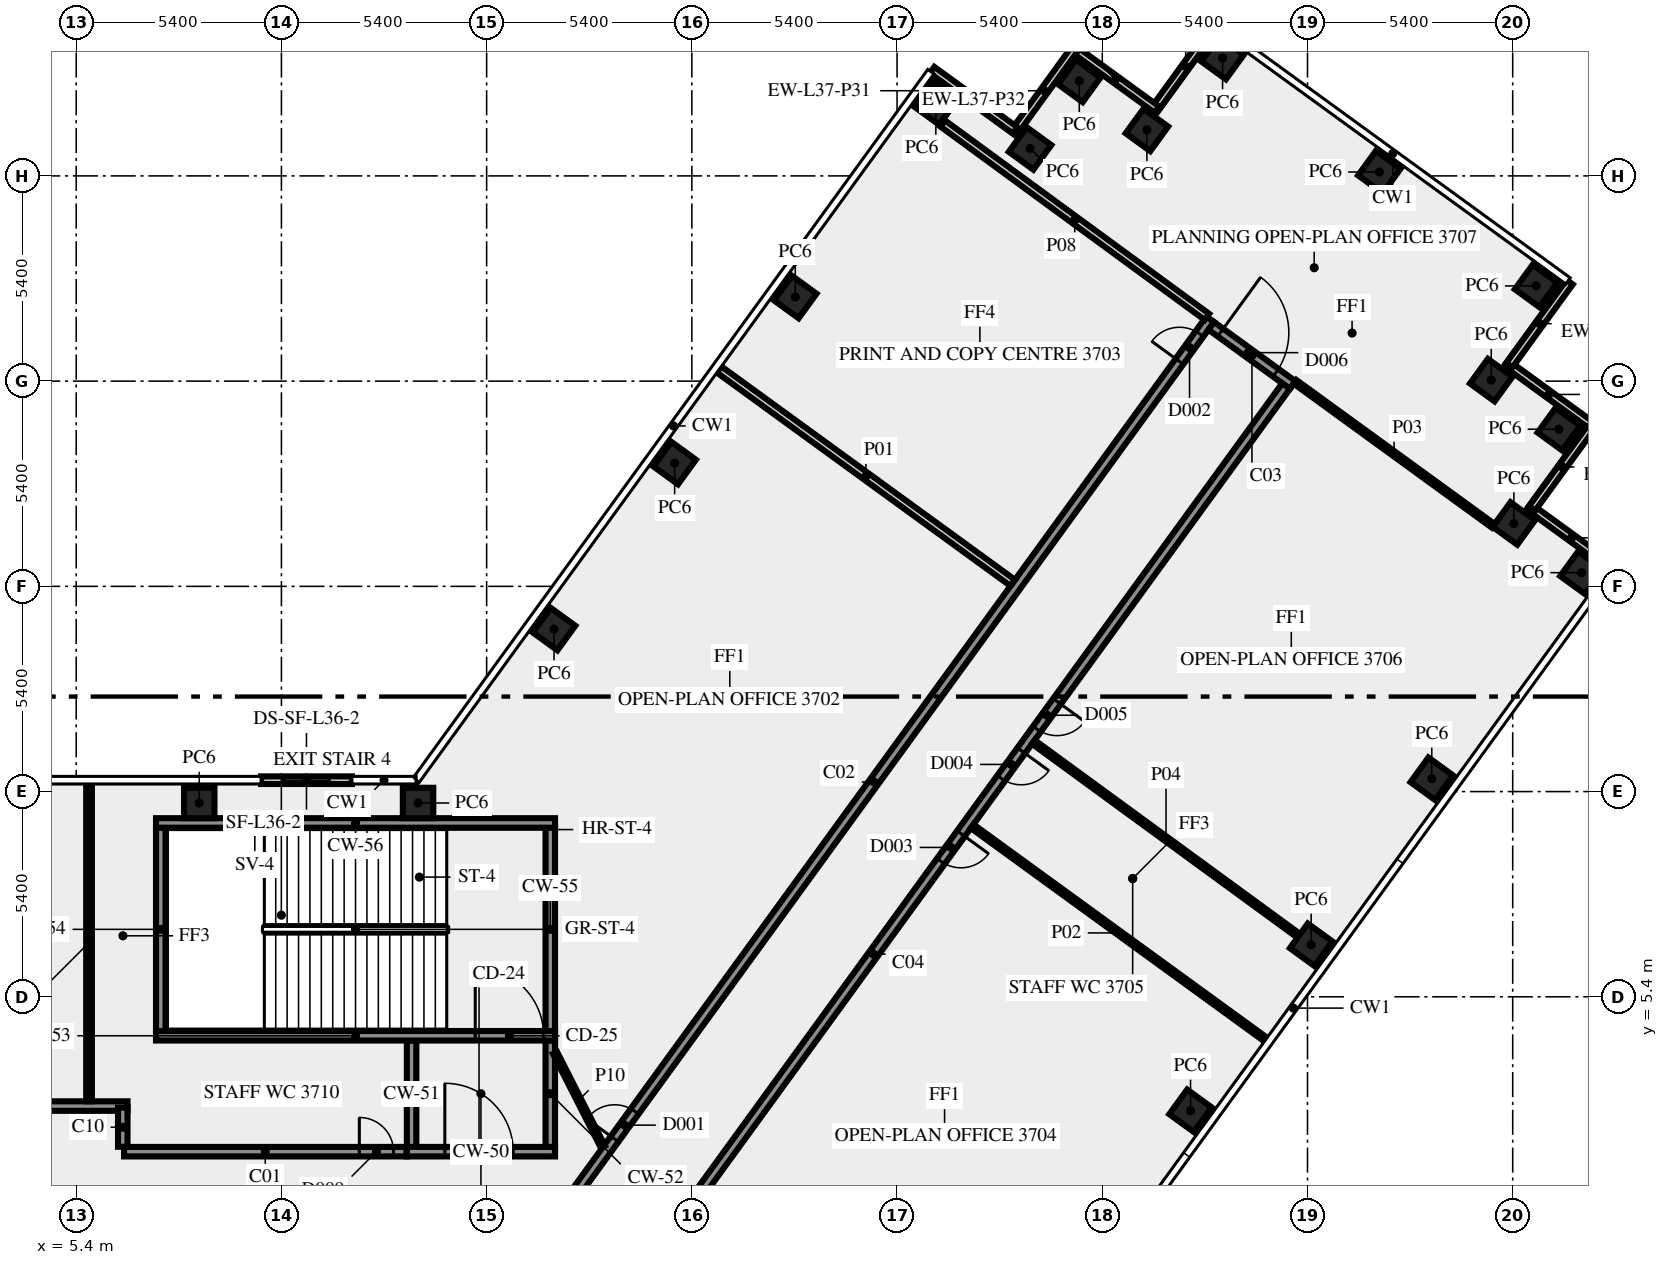
"""IFC4 building model, lengths in metres.
Left out: names, types, materials, properties, quantities, classifications, styles, units other than length and angle.
Written with IfcOpenShell. Run it as: python <this file> out.ifc"""

import sys

from ifc_helpers import new_model, si_unit, direction, frame, frame_2d, origin, origin_2d, place, context, subcontext, project, spatial, rectangle, extrude, element, fill, save


model = new_model("IFC4")
c1 = context("Model", 3, precision=1e-05, world=origin(), true_north=direction((0.0, 1.0)))
c2 = subcontext(c1, "Body", "Model", "MODEL_VIEW")
j1 = project(units=[si_unit("LENGTHUNIT", "METRE"), si_unit("PLANEANGLEUNIT", "RADIAN")], contexts=[c1])
p1 = place(None, origin())
s1 = spatial("IfcSite", under=j1, at=p1, CompositionType="ELEMENT")
p2 = place(p1, origin())
s2 = spatial("IfcBuilding", under=s1, at=p2, CompositionType="ELEMENT")
p3 = place(p2, frame((0.0, 0.0, 160.0)))
s3 = spatial("IfcBuildingStorey", under=s2, at=p3, CompositionType="ELEMENT", Elevation=160.0)
for number, where, z_axis, x_axis in (
    (1, (34.722, 2.4, 0.0), (0.0, 0.0, 1.0), (0.588, 0.809, 0.0)),
    (2, (37.896, 6.769, 0.0), (0.0, 0.0, 1.0), (0.588, 0.809, 0.0)),
    (3, (41.07, 11.137, 0.0), (0.0, 0.0, 1.0), (0.588, 0.809, 0.0)),
    (4, (45.01, 16.56, 0.0), (0.0, 0.0, 1.0), (0.588, 0.809, 0.0)),
    (5, (43.231, 17.854, 0.0), (0.0, 0.0, 1.0), (0.588, 0.809, 0.0)),
    (6, (44.415, 20.335, 0.0), (0.0, 0.0, 1.0), (0.588, 0.809, 0.0)),
    (7, (42.635, 21.626, 0.0), (0.0, 0.0, 1.0), (-0.809, 0.588, 0.0)),
    (8, (43.815, 24.105, 0.0), (0.0, 0.0, 1.0), (-0.809, 0.588, 0.0)),
    (9, (39.691, 27.102, 0.0), (0.0, 0.0, 1.0), (-0.809, 0.588, 0.0)),
    (10, (35.565, 30.1, 0.0), (0.0, 0.0, 1.0), (-0.588, -0.809, 0.0)),
    (11, (33.574, 28.209, 0.0), (0.0, 0.0, 1.0), (-0.809, 0.588, 0.0)),
    (12, (31.795, 29.5, 0.0), (0.0, 0.0, 1.0), (-0.588, -0.809, 0.0)),
    (13, (30.499, 27.723, 0.0), (0.0, 0.0, 1.0), (-0.809, 0.588, 0.0)),
    (14, (28.02, 28.905, 0.0), (0.0, 0.0, 1.0), (-0.809, 0.588, 0.0)),
    (15, (24.321, 23.812, 0.0), (0.0, 0.0, 1.0), (-0.588, -0.809, 0.0)),
    (16, (21.147, 19.444, 0.0), (0.0, 0.0, 1.0), (-0.588, -0.809, 0.0)),
    (17, (17.974, 15.075, 0.0), (0.0, 0.0, 1.0), (-0.588, -0.809, 0.0)),
    (18, (14.395, 10.5, 0.0), (0.0, 0.0, 1.0), (-1.0, 0.0, 0.0)),
    (19, (8.637, 10.5, 0.0), (0.0, 0.0, 1.0), (-1.0, 0.0, 0.0)),
):
    element("IfcColumn", number, at=place(p3, frame(where, z_axis=z_axis, x_axis=x_axis)), inside=s3, PredefinedType="COLUMN", context=c2, shape_type="SweptSolid", body=[
        extrude(rectangle(XDim=0.8, YDim=0.8, at=origin_2d()), origin(), (0.0, 0.0, 1.0), 3.65),
    ])
for number, where, z_axis, x_axis in (
    (20, (45.842, 16.685, 0.0), (0.0, 0.0, 1.0), (-0.809, 0.588, 0.0)),
    (21, (43.709, 18.249, 0.0), (0.0, 0.0, 1.0), (0.588, 0.809, 0.0)),
    (22, (45.245, 20.456, 0.0), (0.0, 0.0, 1.0), (-0.809, 0.588, 0.0)),
    (23, (43.113, 22.02, 0.0), (0.0, 0.0, 1.0), (0.588, 0.809, 0.0)),
    (24, (35.388, 30.97, 0.0), (0.0, 0.0, 1.0), (-0.588, -0.809, 0.0)),
    (25, (33.838, 28.744, 0.0), (0.0, 0.0, 1.0), (-0.809, 0.588, 0.0)),
    (26, (31.67, 30.333, 0.0), (0.0, 0.0, 1.0), (-0.588, -0.809, 0.0)),
    (27, (30.106, 28.2, 0.0), (0.0, 0.0, 1.0), (-0.809, 0.588, 0.0)),
):
    element("IfcWall", number, at=place(p3, frame(where, z_axis=z_axis, x_axis=x_axis)), inside=s3, PredefinedType="SOLIDWALL", context=c2, shape_type="SweptSolid", body=[
        extrude(rectangle(XDim=2.7, YDim=0.2, at=frame_2d((1.35, 0.0))), origin(), (0.0, 0.0, 1.0), 3.65),
    ])
p4 = place(p3, frame((12.655, 11.1, 0.0), z_axis=(0.0, 0.0, 1.0), x_axis=(-1.0, 0.0, 0.0)))
e28 = element("IfcWall", 28, at=p4, inside=s3, PredefinedType="SOLIDWALL", context=c2, shape_type="SweptSolid", body=[
    extrude(rectangle(XDim=2.392, YDim=0.2, at=frame_2d((1.196, 0.0))), origin(), (0.0, 0.0, 1.0), 3.65),
])
p5 = place(p4, frame((0.596, 0.0, 1.0)))
e29 = element("IfcOpeningElement", 29, at=p5, cuts=e28, PredefinedType="OPENING", context=c2, shape_type="SweptSolid", body=[
    extrude(rectangle(XDim=1.2, YDim=1.2, at=frame_2d((0.6, 0.6))), frame((0.0, 0.11, 0.0), z_axis=(0.0, -1.0, 0.0), x_axis=(1.0, 0.0, 0.0)), (0.0, 0.0, 1.0), 0.22),
])
p6 = place(p3, frame((14.1, 1.325, 0.0), z_axis=(0.0, 0.0, 1.0), x_axis=(1.0, 0.0, 0.0)))
e30 = element("IfcWall", 30, at=p6, inside=s3, PredefinedType="SHEAR", context=c2, shape_type="SweptSolid", body=[
    extrude(rectangle(XDim=3.9, YDim=0.25, at=frame_2d((1.95, 0.0))), origin(), (0.0, 0.0, 1.0), 3.65),
])
p7 = place(p6, frame((1.0, 0.0, 0.0)))
e31 = element("IfcOpeningElement", 31, at=p7, cuts=e30, PredefinedType="OPENING", context=c2, shape_type="SweptSolid", body=[
    extrude(rectangle(XDim=1.8, YDim=2.1, at=frame_2d((0.9, 1.05))), frame((0.0, 0.135, 0.0), z_axis=(0.0, -1.0, 0.0), x_axis=(1.0, 0.0, 0.0)), (0.0, 0.0, 1.0), 0.27),
])
for number, where, z_axis, x_axis in (
    (32, (14.225, 1.45, 0.0), (0.0, 0.0, 1.0), (0.0, 1.0, 0.0)),
    (33, (17.875, 1.45, 0.0), (0.0, 0.0, 1.0), (0.0, 1.0, 0.0)),
):
    element("IfcWall", number, at=place(p3, frame(where, z_axis=z_axis, x_axis=x_axis)), inside=s3, PredefinedType="SHEAR", context=c2, shape_type="SweptSolid", body=[
        extrude(rectangle(XDim=2.8, YDim=0.25, at=frame_2d((1.4, 0.0))), origin(), (0.0, 0.0, 1.0), 3.65),
    ])
p8 = place(p3, frame((7.5, 4.375, 0.0), z_axis=(0.0, 0.0, 1.0), x_axis=(1.0, 0.0, 0.0)))
e34 = element("IfcWall", 34, at=p8, inside=s3, PredefinedType="SHEAR", context=c2, shape_type="SweptSolid", body=[
    extrude(rectangle(XDim=10.5, YDim=0.25, at=frame_2d((5.25, 0.0))), origin(), (0.0, 0.0, 1.0), 3.65),
])
p9 = place(p8, frame((8.4, 0.0, 0.0)))
e35 = element("IfcOpeningElement", 35, at=p9, cuts=e34, PredefinedType="OPENING", context=c2, shape_type="SweptSolid", body=[
    extrude(rectangle(XDim=1.8, YDim=2.1, at=frame_2d((0.9, 1.05))), frame((0.0, 0.135, 0.0), z_axis=(0.0, -1.0, 0.0), x_axis=(1.0, 0.0, 0.0)), (0.0, 0.0, 1.0), 0.27),
])
for number, where, z_axis, x_axis in (
    (36, (7.625, 4.5, 0.0), (0.0, 0.0, 1.0), (0.0, 1.0, 0.0)),
    (37, (17.875, 4.5, 0.0), (0.0, 0.0, 1.0), (0.0, 1.0, 0.0)),
):
    element("IfcWall", number, at=place(p3, frame(where, z_axis=z_axis, x_axis=x_axis)), inside=s3, PredefinedType="SHEAR", context=c2, shape_type="SweptSolid", body=[
        extrude(rectangle(XDim=5.35, YDim=0.25, at=frame_2d((2.675, 0.0))), origin(), (0.0, 0.0, 1.0), 3.65),
    ])
p10 = place(p3, frame((7.5, 9.975, 0.0), z_axis=(0.0, 0.0, 1.0), x_axis=(1.0, 0.0, 0.0)))
e38 = element("IfcWall", 38, at=p10, inside=s3, PredefinedType="SHEAR", context=c2, shape_type="SweptSolid", body=[
    extrude(rectangle(XDim=10.5, YDim=0.25, at=frame_2d((5.25, 0.0))), origin(), (0.0, 0.0, 1.0), 3.65),
])
p11 = place(p10, frame((2.0, 0.0, 1.0)))
e39 = element("IfcOpeningElement", 39, at=p11, cuts=e38, PredefinedType="OPENING", context=c2, shape_type="SweptSolid", body=[
    extrude(rectangle(XDim=1.2, YDim=1.2, at=frame_2d((0.6, 0.6))), frame((0.0, 0.135, 0.0), z_axis=(0.0, -1.0, 0.0), x_axis=(1.0, 0.0, 0.0)), (0.0, 0.0, 1.0), 0.27),
])
p12 = place(p3, frame((6.659, 1.325, 0.0), z_axis=(0.0, 0.0, 1.0), x_axis=(1.0, 0.0, 0.0)))
e40 = element("IfcWall", 40, at=p12, inside=s3, PredefinedType="SOLIDWALL", context=c2, shape_type="SweptSolid", body=[
    extrude(rectangle(XDim=7.431, YDim=0.25, at=frame_2d((3.716, 0.0))), origin(), (0.0, 0.0, 1.0), 3.65),
])
p13 = place(p12, frame((6.191, 0.0, 0.0)))
e41 = element("IfcOpeningElement", 41, at=p13, cuts=e40, PredefinedType="OPENING", context=c2, shape_type="SweptSolid", body=[
    extrude(rectangle(XDim=0.9, YDim=2.1, at=frame_2d((0.45, 1.05))), frame((0.0, 0.135, 0.0), z_axis=(0.0, -1.0, 0.0), x_axis=(1.0, 0.0, 0.0)), (0.0, 0.0, 1.0), 0.27),
])
p14 = place(p3, frame((17.545, -1.125, 0.0), z_axis=(0.0, 0.0, 1.0), x_axis=(0.587786330937, 0.809016210693, 0.0)))
e42 = element("IfcWall", 42, at=p14, inside=s3, PredefinedType="SOLIDWALL", context=c2, shape_type="SweptSolid", body=[
    extrude(rectangle(XDim=30.103, YDim=0.25, at=frame_2d((15.052, 0.0))), origin(), (0.0, 0.0, 1.0), 3.65),
])
p15 = place(p14, frame((3.441, 0.0, 0.0)))
e43 = element("IfcOpeningElement", 43, at=p15, cuts=e42, PredefinedType="OPENING", context=c2, shape_type="SweptSolid", body=[
    extrude(rectangle(XDim=0.9, YDim=2.1, at=frame_2d((0.45, 1.05))), frame((0.0, 0.135, 0.0), z_axis=(0.0, -1.0, 0.0), x_axis=(1.0, 0.0, 0.0)), (0.0, 0.0, 1.0), 0.27),
])
p16 = place(p14, frame((28.729, 0.0, 0.0)))
e44 = element("IfcOpeningElement", 44, at=p16, cuts=e42, PredefinedType="OPENING", context=c2, shape_type="SweptSolid", body=[
    extrude(rectangle(XDim=0.9, YDim=2.1, at=frame_2d((0.45, 1.05))), frame((0.0, 0.135, 0.0), z_axis=(0.0, -1.0, 0.0), x_axis=(1.0, 0.0, 0.0)), (0.0, 0.0, 1.0), 0.27),
])
p17 = place(p3, frame((35.267, 23.054, 0.0), z_axis=(0.0, 0.0, 1.0), x_axis=(0.809038743598, -0.587755315891, 0.0)))
e45 = element("IfcWall", 45, at=p17, inside=s3, PredefinedType="SOLIDWALL", context=c2, shape_type="SweptSolid", body=[
    extrude(rectangle(XDim=2.65, YDim=0.25, at=frame_2d((1.325, 0.0))), origin(), (0.0, 0.0, 1.0), 3.65),
])
p18 = place(p17, frame((0.3, 0.0, 0.0)))
e46 = element("IfcOpeningElement", 46, at=p18, cuts=e45, PredefinedType="OPENING", context=c2, shape_type="SweptSolid", body=[
    extrude(rectangle(XDim=1.8, YDim=2.1, at=frame_2d((0.9, 1.05))), frame((0.0, 0.135, 0.0), z_axis=(0.0, -1.0, 0.0), x_axis=(1.0, 0.0, 0.0)), (0.0, 0.0, 1.0), 0.27),
])
p19 = place(p3, frame((37.236, 21.469, 0.0), z_axis=(0.0, 0.0, 1.0), x_axis=(-0.58778344073, -0.809018310549, 0.0)))
e47 = element("IfcWall", 47, at=p19, inside=s3, PredefinedType="SOLIDWALL", context=c2, shape_type="SweptSolid", body=[
    extrude(rectangle(XDim=28.42, YDim=0.25, at=frame_2d((14.21, 0.0))), origin(), (0.0, 0.0, 1.0), 3.65),
])
p20 = place(p19, frame((14.554, 0.0, 0.0)))
e48 = element("IfcOpeningElement", 48, at=p20, cuts=e47, PredefinedType="OPENING", context=c2, shape_type="SweptSolid", body=[
    extrude(rectangle(XDim=0.9, YDim=2.1, at=frame_2d((0.45, 1.05))), frame((0.0, 0.135, 0.0), z_axis=(0.0, -1.0, 0.0), x_axis=(1.0, 0.0, 0.0)), (0.0, 0.0, 1.0), 0.27),
])
p21 = place(p19, frame((10.255, 0.0, 0.0)))
e49 = element("IfcOpeningElement", 49, at=p21, cuts=e47, PredefinedType="OPENING", context=c2, shape_type="SweptSolid", body=[
    extrude(rectangle(XDim=0.9, YDim=2.1, at=frame_2d((0.45, 1.05))), frame((0.0, 0.135, 0.0), z_axis=(0.0, -1.0, 0.0), x_axis=(1.0, 0.0, 0.0)), (0.0, 0.0, 1.0), 0.27),
])
p22 = place(p19, frame((11.854, 0.0, 0.0)))
e50 = element("IfcOpeningElement", 50, at=p22, cuts=e47, PredefinedType="OPENING", context=c2, shape_type="SweptSolid", body=[
    extrude(rectangle(XDim=0.9, YDim=2.1, at=frame_2d((0.45, 1.05))), frame((0.0, 0.135, 0.0), z_axis=(0.0, -1.0, 0.0), x_axis=(1.0, 0.0, 0.0)), (0.0, 0.0, 1.0), 0.27),
])
p23 = place(p3, frame((-4.5, 2.525, 0.0), z_axis=(0.0, 0.0, 1.0), x_axis=(1.0, 0.0, 0.0)))
e51 = element("IfcWall", 51, at=p23, inside=s3, PredefinedType="SOLIDWALL", context=c2, shape_type="SweptSolid", body=[
    extrude(rectangle(XDim=11.25, YDim=0.25, at=frame_2d((5.625, 0.0))), origin(), (0.0, 0.0, 1.0), 3.65),
])
p24 = place(p23, frame((1.971, 0.0, 0.0)))
e52 = element("IfcOpeningElement", 52, at=p24, cuts=e51, PredefinedType="OPENING", context=c2, shape_type="SweptSolid", body=[
    extrude(rectangle(XDim=0.9, YDim=2.1, at=frame_2d((0.45, 1.05))), frame((0.0, 0.135, 0.0), z_axis=(0.0, -1.0, 0.0), x_axis=(1.0, 0.0, 0.0)), (0.0, 0.0, 1.0), 0.27),
])
p25 = place(p3, frame((6.625, 2.484, 0.0), z_axis=(0.0, 0.0, 1.0), x_axis=(0.0, -1.0, 0.0)))
e53 = element("IfcWall", 53, at=p25, inside=s3, PredefinedType="SOLIDWALL", context=c2, shape_type="SweptSolid", body=[
    extrude(rectangle(XDim=1.03, YDim=0.25, at=frame_2d((0.515, 0.0))), origin(), (0.0, 0.0, 1.0), 3.65),
])
p26 = place(p3, frame((30.044, 16.292, 0.0), z_axis=(0.0, 0.0, 1.0), x_axis=(-0.80898585166, 0.587828114175, 0.0)))
e54 = element("IfcWall", 54, at=p26, inside=s3, PredefinedType="SOLIDWALL", context=c2, shape_type="SweptSolid", body=[
    extrude(rectangle(XDim=9.55, YDim=0.2, at=frame_2d((4.775, 0.0))), origin(), (0.0, 0.0, 1.0), 2.85),
])
p27 = place(p3, frame((36.702, 4.274, 0.0), z_axis=(0.0, 0.0, 1.0), x_axis=(-0.808998008689, 0.58781138296, 0.0)))
e55 = element("IfcWall", 55, at=p27, inside=s3, PredefinedType="PARTITIONING", context=c2, shape_type="SweptSolid", body=[
    extrude(rectangle(XDim=9.55, YDim=0.12, at=frame_2d((4.775, 0.0))), origin(), (0.0, 0.0, 1.0), 2.85),
])
p28 = place(p3, frame((42.686, 17.794, 0.0), z_axis=(0.0, 0.0, 1.0), x_axis=(-0.809017755079, 0.587784205272, 0.0)))
e56 = element("IfcWall", 56, at=p28, inside=s3, PredefinedType="PARTITIONING", context=c2, shape_type="SweptSolid", body=[
    extrude(rectangle(XDim=6.445, YDim=0.12, at=frame_2d((3.222, 0.0))), origin(), (0.0, 0.0, 1.0), 3.65),
])
p29 = place(p3, frame((30.587, 12.104, 0.0), z_axis=(0.0, 0.0, 1.0), x_axis=(0.807584089733, -0.589752437902, 0.0)))
e57 = element("IfcWall", 57, at=p29, inside=s3, PredefinedType="PARTITIONING", context=c2, shape_type="SweptSolid", body=[
    extrude(rectangle(XDim=8.645, YDim=0.12, at=frame_2d((4.322, 0.0))), origin(), (0.0, 0.0, 1.0), 3.65),
])
p30 = place(p3, frame((5.738, 2.65, 0.0), z_axis=(0.0, 0.0, 1.0), x_axis=(0.0, 1.0, 0.0)))
e58 = element("IfcWall", 58, at=p30, inside=s3, PredefinedType="PARTITIONING", context=c2, shape_type="SweptSolid", body=[
    extrude(rectangle(XDim=8.35, YDim=0.15, at=frame_2d((4.175, 0.0))), origin(), (0.0, 0.0, 1.0), 2.85),
])
p31 = place(p3, frame((28.198, 28.381, 0.0), z_axis=(0.0, 0.0, 1.0), x_axis=(0.806977317905, -0.590582431492, 0.0)))
e59 = element("IfcWall", 59, at=p31, inside=s3, PredefinedType="SOLIDWALL", context=c2, shape_type="SweptSolid", body=[
    extrude(rectangle(XDim=8.62, YDim=0.2, at=frame_2d((4.31, 0.0))), origin(), (0.0, 0.0, 1.0), 3.65),
])
p32 = place(p3, frame((18.0, 3.925, 0.0), z_axis=(0.0, 0.0, 1.0), x_axis=(0.453950796792, -0.891026752736, 0.0)))
e60 = element("IfcWall", 60, at=p32, inside=s3, PredefinedType="PARTITIONING", context=c2, shape_type="SweptSolid", body=[
    extrude(rectangle(XDim=2.778, YDim=0.12, at=frame_2d((1.389, 0.0))), origin(), (0.0, 0.0, 1.0), 3.65),
])
p33 = place(p5, origin())
e61 = element("IfcWindow", 61, at=p33, inside=s3, PartitioningType="SINGLE_PANEL", PredefinedType="WINDOW", context=c2, shape_type="SweptSolid", body=[
    extrude(rectangle(XDim=1.2, YDim=1.2, at=frame_2d((0.6, 0.6))), frame((0.0, 0.03, 0.0), z_axis=(0.0, -1.0, 0.0), x_axis=(1.0, 0.0, 0.0)), (0.0, 0.0, 1.0), 0.06),
])
fill(e29, e61)
p34 = place(p7, origin())
e62 = element("IfcDoor", 62, at=p34, inside=s3, OperationType="DOUBLE_DOOR_SINGLE_SWING", PredefinedType="DOOR", context=c2, shape_type="SweptSolid", body=[
    extrude(rectangle(XDim=1.8, YDim=2.1, at=frame_2d((0.9, 1.05))), frame((0.0, 0.025, 0.0), z_axis=(0.0, -1.0, 0.0), x_axis=(1.0, 0.0, 0.0)), (0.0, 0.0, 1.0), 0.05),
])
fill(e31, e62)
p35 = place(p9, origin())
e63 = element("IfcDoor", 63, at=p35, inside=s3, OperationType="DOUBLE_DOOR_SINGLE_SWING", PredefinedType="DOOR", context=c2, shape_type="SweptSolid", body=[
    extrude(rectangle(XDim=1.8, YDim=2.1, at=frame_2d((0.9, 1.05))), frame((0.0, 0.025, 0.0), z_axis=(0.0, -1.0, 0.0), x_axis=(1.0, 0.0, 0.0)), (0.0, 0.0, 1.0), 0.05),
])
fill(e35, e63)
p36 = place(p11, origin())
e64 = element("IfcWindow", 64, at=p36, inside=s3, PartitioningType="SINGLE_PANEL", PredefinedType="WINDOW", context=c2, shape_type="SweptSolid", body=[
    extrude(rectangle(XDim=1.2, YDim=1.2, at=frame_2d((0.6, 0.6))), frame((0.0, 0.03, 0.0), z_axis=(0.0, -1.0, 0.0), x_axis=(1.0, 0.0, 0.0)), (0.0, 0.0, 1.0), 0.06),
])
fill(e39, e64)
p37 = place(p15, origin())
e65 = element("IfcDoor", 65, at=p37, inside=s3, OperationType="SINGLE_SWING_LEFT", PredefinedType="DOOR", context=c2, shape_type="SweptSolid", body=[
    extrude(rectangle(XDim=0.9, YDim=2.1, at=frame_2d((0.45, 1.05))), frame((0.0, 0.025, 0.0), z_axis=(0.0, -1.0, 0.0), x_axis=(1.0, 0.0, 0.0)), (0.0, 0.0, 1.0), 0.05),
])
fill(e43, e65)
p38 = place(p20, origin())
e66 = element("IfcDoor", 66, at=p38, inside=s3, OperationType="SINGLE_SWING_LEFT", PredefinedType="DOOR", context=c2, shape_type="SweptSolid", body=[
    extrude(rectangle(XDim=0.9, YDim=2.1, at=frame_2d((0.45, 1.05))), frame((0.0, 0.025, 0.0), z_axis=(0.0, -1.0, 0.0), x_axis=(1.0, 0.0, 0.0)), (0.0, 0.0, 1.0), 0.05),
])
fill(e48, e66)
p39 = place(p21, origin())
e67 = element("IfcDoor", 67, at=p39, inside=s3, OperationType="SINGLE_SWING_RIGHT", PredefinedType="DOOR", context=c2, shape_type="SweptSolid", body=[
    extrude(rectangle(XDim=0.9, YDim=2.1, at=frame_2d((0.45, 1.05))), frame((0.0, 0.025, 0.0), z_axis=(0.0, -1.0, 0.0), x_axis=(1.0, 0.0, 0.0)), (0.0, 0.0, 1.0), 0.05),
])
fill(e49, e67)
p40 = place(p18, origin())
e68 = element("IfcDoor", 68, at=p40, inside=s3, OperationType="DOUBLE_DOOR_SINGLE_SWING", PredefinedType="DOOR", context=c2, shape_type="SweptSolid", body=[
    extrude(rectangle(XDim=1.8, YDim=2.1, at=frame_2d((0.9, 1.05))), frame((0.0, 0.025, 0.0), z_axis=(0.0, -1.0, 0.0), x_axis=(1.0, 0.0, 0.0)), (0.0, 0.0, 1.0), 0.05),
])
fill(e46, e68)
p41 = place(p16, origin())
e69 = element("IfcDoor", 69, at=p41, inside=s3, OperationType="SINGLE_SWING_RIGHT", PredefinedType="DOOR", context=c2, shape_type="SweptSolid", body=[
    extrude(rectangle(XDim=0.9, YDim=2.1, at=frame_2d((0.45, 1.05))), frame((0.0, 0.025, 0.0), z_axis=(0.0, -1.0, 0.0), x_axis=(1.0, 0.0, 0.0)), (0.0, 0.0, 1.0), 0.05),
])
fill(e44, e69)
p42 = place(p22, origin())
e70 = element("IfcDoor", 70, at=p42, inside=s3, OperationType="SINGLE_SWING_LEFT", PredefinedType="DOOR", context=c2, shape_type="SweptSolid", body=[
    extrude(rectangle(XDim=0.9, YDim=2.1, at=frame_2d((0.45, 1.05))), frame((0.0, 0.025, 0.0), z_axis=(0.0, -1.0, 0.0), x_axis=(1.0, 0.0, 0.0)), (0.0, 0.0, 1.0), 0.05),
])
fill(e50, e70)
p43 = place(p13, origin())
e71 = element("IfcDoor", 71, at=p43, inside=s3, OperationType="SINGLE_SWING_RIGHT", PredefinedType="DOOR", context=c2, shape_type="SweptSolid", body=[
    extrude(rectangle(XDim=0.9, YDim=2.1, at=frame_2d((0.45, 1.05))), frame((0.0, 0.025, 0.0), z_axis=(0.0, -1.0, 0.0), x_axis=(1.0, 0.0, 0.0)), (0.0, 0.0, 1.0), 0.05),
])
fill(e41, e71)
save(model, sys.argv[1])
